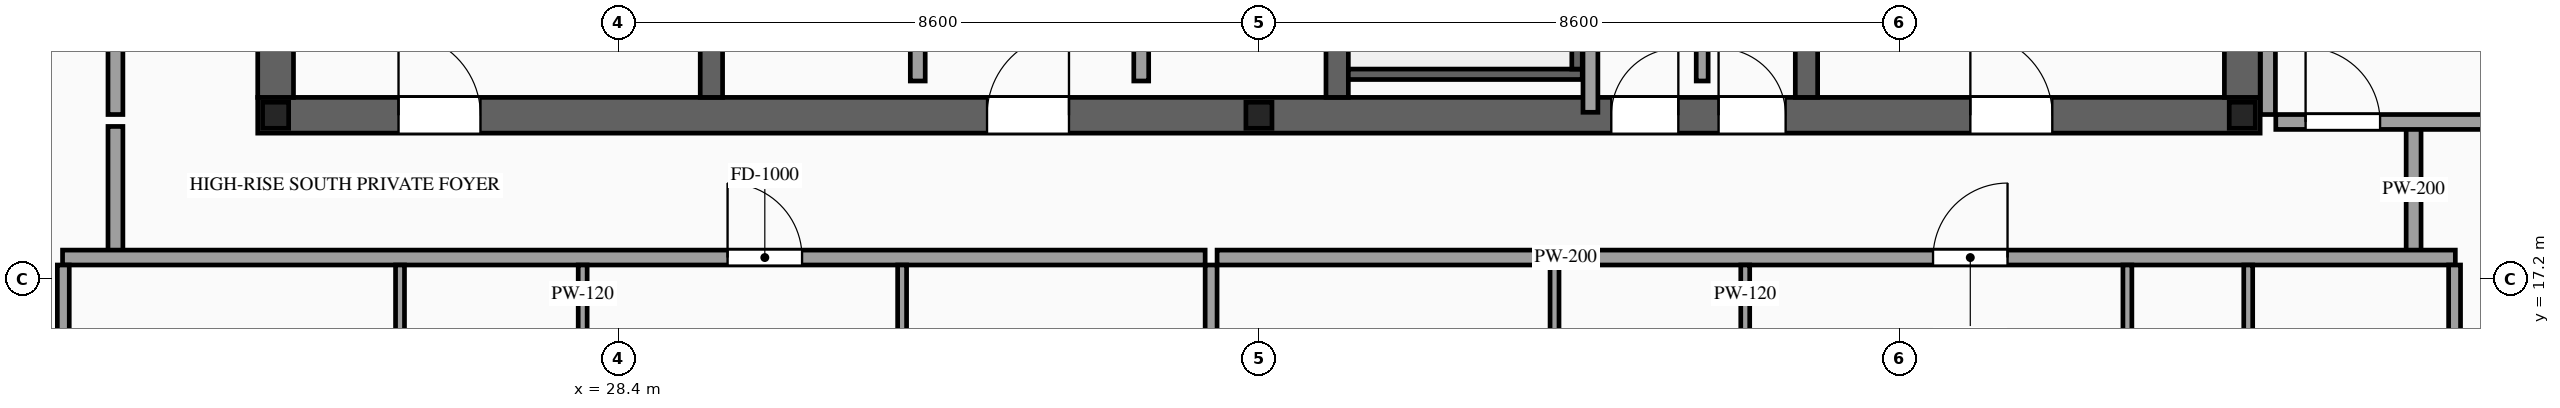
"""IFC4 building model, lengths in metres.
Left out: names, types, materials, properties, quantities, classifications, styles, units other than length and angle.
Written with IfcOpenShell. Run it as: python <this file> out.ifc"""

import sys

from ifc_helpers import new_model, si_unit, direction, frame, frame_2d, origin, origin_2d, place, context, subcontext, project, spatial, rectangle, i_section, extrude, source, transform, mapped, element, fill, save


model = new_model("IFC4")
c1 = context("Model", 3, precision=1e-05, world=origin(), true_north=direction((0.0, 1.0)))
c2 = subcontext(c1, "Body", "Model", "MODEL_VIEW")
j1 = project(units=[si_unit("LENGTHUNIT", "METRE"), si_unit("PLANEANGLEUNIT", "RADIAN")], contexts=[c1])
p1 = place(None, origin())
s1 = spatial("IfcSite", under=j1, at=p1, CompositionType="ELEMENT")
p2 = place(p1, origin())
s2 = spatial("IfcBuilding", under=s1, at=p2, CompositionType="ELEMENT")
p3 = place(p2, frame((0.0, 0.0, 299.6)))
s3 = spatial("IfcBuildingStorey", under=s2, at=p3, CompositionType="ELEMENT", Elevation=299.6)
p4 = place(p3, frame((23.56, 19.4, 0.0), z_axis=(0.0, 0.0, 1.0), x_axis=(1.0, 0.0, 0.0)))
e1 = element("IfcWall", 1, at=p4, inside=s3, PredefinedType="SHEAR", context=c2, shape_type="SweptSolid", body=[
    extrude(rectangle(XDim=26.88, YDim=0.48, at=frame_2d((13.44, 0.0))), origin(), (0.0, 0.0, 1.0), 3.5),
])
p5 = place(p4, frame((1.89, 0.0, 0.0)))
e2 = element("IfcOpeningElement", 2, at=p5, cuts=e1, PredefinedType="OPENING", context=c2, shape_type="SweptSolid", body=[
    extrude(rectangle(XDim=1.1, YDim=2.2, at=frame_2d((0.55, 1.1))), frame((0.0, 0.255, 0.0), z_axis=(0.0, -1.0, 0.0), x_axis=(1.0, 0.0, 0.0)), (0.0, 0.0, 1.0), 0.51),
])
p6 = place(p4, frame((9.79, 0.0, 0.0)))
e3 = element("IfcOpeningElement", 3, at=p6, cuts=e1, PredefinedType="OPENING", context=c2, shape_type="SweptSolid", body=[
    extrude(rectangle(XDim=1.1, YDim=2.2, at=frame_2d((0.55, 1.1))), frame((0.0, 0.255, 0.0), z_axis=(0.0, -1.0, 0.0), x_axis=(1.0, 0.0, 0.0)), (0.0, 0.0, 1.0), 0.51),
])
p7 = place(p4, frame((22.99, 0.0, 0.0)))
e4 = element("IfcOpeningElement", 4, at=p7, cuts=e1, PredefinedType="OPENING", context=c2, shape_type="SweptSolid", body=[
    extrude(rectangle(XDim=1.1, YDim=2.2, at=frame_2d((0.55, 1.1))), frame((0.0, 0.255, 0.0), z_axis=(0.0, -1.0, 0.0), x_axis=(1.0, 0.0, 0.0)), (0.0, 0.0, 1.0), 0.51),
])
p8 = place(p4, frame((19.61, 0.0, 0.0)))
e5 = element("IfcOpeningElement", 5, at=p8, cuts=e1, PredefinedType="OPENING", context=c2, shape_type="SweptSolid", body=[
    extrude(rectangle(XDim=0.9, YDim=2.15, at=frame_2d((0.45, 1.075))), frame((0.0, 0.255, 0.0), z_axis=(0.0, -1.0, 0.0), x_axis=(1.0, 0.0, 0.0)), (0.0, 0.0, 1.0), 0.51),
])
p9 = place(p4, frame((18.17, 0.0, 0.0)))
e6 = element("IfcOpeningElement", 6, at=p9, cuts=e1, PredefinedType="OPENING", context=c2, shape_type="SweptSolid", body=[
    extrude(rectangle(XDim=0.9, YDim=2.15, at=frame_2d((0.45, 1.075))), frame((0.0, 0.255, 0.0), z_axis=(0.0, -1.0, 0.0), x_axis=(1.0, 0.0, 0.0)), (0.0, 0.0, 1.0), 0.51),
])
m1 = source(origin(), c2, "Body", "SweptSolid", [
    extrude(rectangle(XDim=12.32, YDim=0.48, at=frame_2d((6.16, 0.0))), origin(), (0.0, 0.0, 1.0), 3.5),
])
for number, where, z_axis, x_axis in (
    (7, (23.8, 19.64, 0.0), (0.0, 0.0, 1.0), (0.0, 1.0, 0.0)),
    (8, (50.2, 19.64, 0.0), (0.0, 0.0, 1.0), (0.0, 1.0, 0.0)),
):
    element("IfcWall", number, at=place(p3, frame(where, z_axis=z_axis, x_axis=x_axis)), inside=s3, PredefinedType="SHEAR", context=c2, shape_type="MappedRepresentation", body=[
        mapped(m1, transform((0.0, 0.0, 0.0), scale=1.0)),
    ])
m2 = source(origin(), c2, "Body", "SweptSolid", [
    extrude(rectangle(XDim=12.32, YDim=0.3, at=frame_2d((6.16, 0.0))), origin(), (0.0, 0.0, 1.0), 3.5),
])
for number, where, z_axis, x_axis in (
    (9, (29.65, 19.64, 0.0), (0.0, 0.0, 1.0), (0.0, 1.0, 0.0)),
    (10, (38.05, 19.64, 0.0), (0.0, 0.0, 1.0), (0.0, 1.0, 0.0)),
):
    element("IfcWall", number, at=place(p3, frame(where, z_axis=z_axis, x_axis=x_axis)), inside=s3, PredefinedType="SOLIDWALL", context=c2, shape_type="MappedRepresentation", body=[
        mapped(m2, transform((0.0, 0.0, 0.0), scale=1.0)),
    ])
p10 = place(p3, frame((44.35, 19.64, 0.0), z_axis=(0.0, 0.0, 1.0), x_axis=(0.0, 1.0, 0.0)))
e11 = element("IfcWall", 11, at=p10, inside=s3, PredefinedType="SOLIDWALL", context=c2, shape_type="SweptSolid", body=[
    extrude(rectangle(XDim=12.32, YDim=0.3, at=frame_2d((6.16, 0.0))), origin(), (0.0, 0.0, 1.0), 3.5),
])
p11 = place(p10, frame((6.56, 0.0, 0.0)))
e12 = element("IfcOpeningElement", 12, at=p11, cuts=e11, PredefinedType="OPENING", context=c2, shape_type="SweptSolid", body=[
    extrude(rectangle(XDim=1.1, YDim=2.2, at=frame_2d((0.55, 1.1))), frame((0.0, 0.165, 0.0), z_axis=(0.0, -1.0, 0.0), x_axis=(1.0, 0.0, 0.0)), (0.0, 0.0, 1.0), 0.33),
])
p12 = place(p10, frame((8.66, 0.0, 0.0)))
e13 = element("IfcOpeningElement", 13, at=p12, cuts=e11, PredefinedType="OPENING", context=c2, shape_type="SweptSolid", body=[
    extrude(rectangle(XDim=1.1, YDim=2.2, at=frame_2d((0.55, 1.1))), frame((0.0, 0.165, 0.0), z_axis=(0.0, -1.0, 0.0), x_axis=(1.0, 0.0, 0.0)), (0.0, 0.0, 1.0), 0.33),
])
p13 = place(p10, frame((10.76, 0.0, 0.0)))
e14 = element("IfcOpeningElement", 14, at=p13, cuts=e11, PredefinedType="OPENING", context=c2, shape_type="SweptSolid", body=[
    extrude(rectangle(XDim=1.1, YDim=2.2, at=frame_2d((0.55, 1.1))), frame((0.0, 0.165, 0.0), z_axis=(0.0, -1.0, 0.0), x_axis=(1.0, 0.0, 0.0)), (0.0, 0.0, 1.0), 0.33),
])
m3 = source(origin(), c2, "Body", "SweptSolid", [
    extrude(i_section(OverallWidth=0.35, OverallDepth=0.35, WebThickness=0.012, FlangeThickness=0.019, at=origin_2d()), origin(), (0.0, 0.0, 1.0), 3.5),
])
for number, where, z_axis, x_axis in (
    (15, (23.8, 19.4, 0.0), (0.0, 0.0, 1.0), (1.0, 0.0, 0.0)),
    (16, (37.0, 19.4, 0.0), (0.0, 0.0, 1.0), (1.0, 0.0, 0.0)),
    (17, (50.2, 19.4, 0.0), (0.0, 0.0, 1.0), (1.0, 0.0, 0.0)),
):
    element("IfcColumn", number, at=place(p3, frame(where, z_axis=z_axis, x_axis=x_axis)), inside=s3, PredefinedType="COLUMN", context=c2, shape_type="MappedRepresentation", body=[
        mapped(m3, transform((0.0, 0.0, 0.0), scale=1.0)),
    ])
m4 = source(origin(), c2, "Body", "SweptSolid", [
    extrude(rectangle(XDim=3.14, YDim=0.14, at=frame_2d((1.57, 0.0))), origin(), (0.0, 0.0, 1.0), 3.28),
])
p14 = place(p3, frame((38.2, 19.95, 0.0), z_axis=(0.0, 0.0, 1.0), x_axis=(1.0, 0.0, 0.0)))
e18 = element("IfcWall", 18, at=p14, inside=s3, PredefinedType="SOLIDWALL", context=c2, shape_type="MappedRepresentation", body=[
    mapped(m4, transform((0.0, 0.0, 0.0), scale=1.0)),
])
m5 = source(origin(), c2, "Body", "SweptSolid", [
    extrude(rectangle(XDim=8.94, YDim=0.14, at=frame_2d((4.47, 0.0))), origin(), (0.0, 0.0, 1.0), 3.28),
])
p15 = place(p3, frame((41.27, 20.02, 0.0), z_axis=(0.0, 0.0, 1.0), x_axis=(0.0, 1.0, 0.0)))
e19 = element("IfcWall", 19, at=p15, inside=s3, PredefinedType="SOLIDWALL", context=c2, shape_type="MappedRepresentation", body=[
    mapped(m5, transform((0.0, 0.0, 0.0), scale=1.0)),
])
p16 = place(p3, frame((32.42, 19.86, 0.0), z_axis=(0.0, 0.0, 1.0), x_axis=(0.0, 1.0, 0.0)))
e20 = element("IfcWall", 20, at=p16, inside=s3, PredefinedType="PARTITIONING", context=c2, shape_type="SweptSolid", body=[
    extrude(rectangle(XDim=5.84, YDim=0.2, at=frame_2d((2.92, 0.0))), origin(), (0.0, 0.0, 1.0), 3.28),
])
p17 = place(p16, frame((2.47, 0.0, 0.0)))
e21 = element("IfcOpeningElement", 21, at=p17, cuts=e20, PredefinedType="OPENING", context=c2, shape_type="SweptSolid", body=[
    extrude(rectangle(XDim=0.9, YDim=2.15, at=frame_2d((0.45, 1.075))), frame((0.0, 0.115, 0.0), z_axis=(0.0, -1.0, 0.0), x_axis=(1.0, 0.0, 0.0)), (0.0, 0.0, 1.0), 0.23),
])
p18 = place(p3, frame((35.42, 19.86, 0.0), z_axis=(0.0, 0.0, 1.0), x_axis=(0.0, 1.0, 0.0)))
e22 = element("IfcWall", 22, at=p18, inside=s3, PredefinedType="PARTITIONING", context=c2, shape_type="SweptSolid", body=[
    extrude(rectangle(XDim=2.24, YDim=0.2, at=frame_2d((1.12, 0.0))), origin(), (0.0, 0.0, 1.0), 3.28),
])
p19 = place(p18, frame((0.67, 0.0, 0.0)))
e23 = element("IfcOpeningElement", 23, at=p19, cuts=e22, PredefinedType="OPENING", context=c2, shape_type="SweptSolid", body=[
    extrude(rectangle(XDim=0.9, YDim=2.15, at=frame_2d((0.45, 1.075))), frame((0.0, 0.115, 0.0), z_axis=(0.0, -1.0, 0.0), x_axis=(1.0, 0.0, 0.0)), (0.0, 0.0, 1.0), 0.23),
])
m6 = source(origin(), c2, "Body", "SweptSolid", [
    extrude(rectangle(XDim=1.34, YDim=0.16, at=frame_2d((0.67, 0.0))), origin(), (0.0, 0.0, 1.0), 3.28),
])
p20 = place(p3, frame((42.95, 19.86, 0.0), z_axis=(0.0, 0.0, 1.0), x_axis=(0.0, 1.0, 0.0)))
e24 = element("IfcWall", 24, at=p20, inside=s3, PredefinedType="PARTITIONING", context=c2, shape_type="MappedRepresentation", body=[
    mapped(m6, transform((0.0, 0.0, 0.0), scale=1.0)),
])
m7 = source(origin(), c2, "Body", "SweptSolid", [
    extrude(rectangle(XDim=6.06, YDim=0.2, at=frame_2d((3.03, 0.0))), origin(), (0.0, 0.0, 1.0), 3.28),
])
p21 = place(p3, frame((41.45, 19.44, 0.0), z_axis=(0.0, 0.0, 1.0), x_axis=(0.0, 1.0, 0.0)))
e25 = element("IfcWall", 25, at=p21, inside=s3, PredefinedType="PARTITIONING", context=c2, shape_type="MappedRepresentation", body=[
    mapped(m7, transform((0.0, 0.0, 0.0), scale=1.0)),
])
m8 = source(origin(), c2, "Body", "SweptSolid", [
    extrude(rectangle(XDim=1.7, YDim=0.2, at=frame_2d((0.85, 0.0))), origin(), (0.0, 0.0, 1.0), 3.28),
])
for number, where, z_axis, x_axis in (
    (26, (21.65, 17.55, 0.0), (0.0, 0.0, 1.0), (0.0, 1.0, 0.0)),
    (27, (52.5, 17.55, 0.0), (0.0, 0.0, 1.0), (0.0, 1.0, 0.0)),
):
    element("IfcWall", number, at=place(p3, frame(where, z_axis=z_axis, x_axis=x_axis)), inside=s3, PredefinedType="PARTITIONING", context=c2, shape_type="MappedRepresentation", body=[
        mapped(m8, transform((0.0, 0.0, 0.0), scale=1.0)),
    ])
p22 = place(p3, frame((20.94, 17.49, 0.0), z_axis=(0.0, 0.0, 1.0), x_axis=(1.0, 0.0, 0.0)))
e28 = element("IfcWall", 28, at=p22, inside=s3, PredefinedType="PARTITIONING", context=c2, shape_type="SweptSolid", body=[
    extrude(rectangle(XDim=15.338, YDim=0.2, at=frame_2d((7.669, 0.0))), origin(), (0.0, 0.0, 1.0), 3.28),
])
p23 = place(p22, frame((8.927, 0.0, 0.0)))
e29 = element("IfcOpeningElement", 29, at=p23, cuts=e28, PredefinedType="OPENING", context=c2, shape_type="SweptSolid", body=[
    extrude(rectangle(XDim=1.0, YDim=2.2, at=frame_2d((0.5, 1.1))), frame((0.0, 0.115, 0.0), z_axis=(0.0, -1.0, 0.0), x_axis=(1.0, 0.0, 0.0)), (0.0, 0.0, 1.0), 0.23),
])
m9 = source(origin(), c2, "Body", "SweptSolid", [
    extrude(rectangle(XDim=10.54, YDim=0.16, at=frame_2d((5.27, 0.0))), origin(), (0.0, 0.0, 1.0), 3.28),
])
p24 = place(p3, frame((36.358, 6.85, 0.0), z_axis=(0.0, 0.0, 1.0), x_axis=(0.0, 1.0, 0.0)))
e30 = element("IfcWall", 30, at=p24, inside=s3, PredefinedType="PARTITIONING", context=c2, shape_type="MappedRepresentation", body=[
    mapped(m9, transform((0.0, 0.0, 0.0), scale=1.0)),
])
m10 = source(origin(), c2, "Body", "SweptSolid", [
    extrude(rectangle(XDim=2.9, YDim=0.12, at=frame_2d((1.45, 0.0))), origin(), (0.0, 0.0, 1.0), 3.28),
])
p25 = place(p3, frame((25.47, 14.49, 0.0), z_axis=(0.0, 0.0, 1.0), x_axis=(0.0, 1.0, 0.0)))
e31 = element("IfcWall", 31, at=p25, inside=s3, PredefinedType="PARTITIONING", context=c2, shape_type="MappedRepresentation", body=[
    mapped(m10, transform((0.0, 0.0, 0.0), scale=1.0)),
])
p26 = place(p3, frame((27.922, 14.49, 0.0), z_axis=(0.0, 0.0, 1.0), x_axis=(0.0, 1.0, 0.0)))
e32 = element("IfcWall", 32, at=p26, inside=s3, PredefinedType="PARTITIONING", context=c2, shape_type="SweptSolid", body=[
    extrude(rectangle(XDim=2.9, YDim=0.12, at=frame_2d((1.45, 0.0))), origin(), (0.0, 0.0, 1.0), 3.28),
])
p27 = place(p26, frame((1.025, 0.0, 0.0)))
e33 = element("IfcOpeningElement", 33, at=p27, cuts=e32, PredefinedType="OPENING", context=c2, shape_type="SweptSolid", body=[
    extrude(rectangle(XDim=0.85, YDim=2.1, at=frame_2d((0.425, 1.05))), frame((0.0, 0.075, 0.0), z_axis=(0.0, -1.0, 0.0), x_axis=(1.0, 0.0, 0.0)), (0.0, 0.0, 1.0), 0.15),
])
p28 = place(p3, frame((32.21, 14.49, 0.0), z_axis=(0.0, 0.0, 1.0), x_axis=(0.0, 1.0, 0.0)))
e34 = element("IfcWall", 34, at=p28, inside=s3, PredefinedType="PARTITIONING", context=c2, shape_type="MappedRepresentation", body=[
    mapped(m10, transform((0.0, 0.0, 0.0), scale=1.0)),
])
p29 = place(p3, frame((36.438, 17.49, 0.0), z_axis=(0.0, 0.0, 1.0), x_axis=(1.0, 0.0, 0.0)))
e35 = element("IfcWall", 35, at=p29, inside=s3, PredefinedType="PARTITIONING", context=c2, shape_type="SweptSolid", body=[
    extrude(rectangle(XDim=16.622, YDim=0.2, at=frame_2d((8.311, 0.0))), origin(), (0.0, 0.0, 1.0), 3.28),
])
p30 = place(p29, frame((9.611, 0.0, 0.0)))
e36 = element("IfcOpeningElement", 36, at=p30, cuts=e35, PredefinedType="OPENING", context=c2, shape_type="SweptSolid", body=[
    extrude(rectangle(XDim=1.0, YDim=2.2, at=frame_2d((0.5, 1.1))), frame((0.0, 0.115, 0.0), z_axis=(0.0, -1.0, 0.0), x_axis=(1.0, 0.0, 0.0)), (0.0, 0.0, 1.0), 0.23),
])
m11 = source(origin(), c2, "Body", "SweptSolid", [
    extrude(rectangle(XDim=10.39, YDim=0.16, at=frame_2d((5.195, 0.0))), origin(), (0.0, 0.0, 1.0), 3.28),
])
for number, where, z_axis, x_axis in (
    (37, (20.95, 7.0, 0.0), (0.0, 0.0, 1.0), (0.0, 1.0, 0.0)),
    (38, (53.05, 7.0, 0.0), (0.0, 0.0, 1.0), (0.0, 1.0, 0.0)),
):
    element("IfcWall", number, at=place(p3, frame(where, z_axis=z_axis, x_axis=x_axis)), inside=s3, PredefinedType="PARTITIONING", context=c2, shape_type="MappedRepresentation", body=[
        mapped(m11, transform((0.0, 0.0, 0.0), scale=1.0)),
    ])
p31 = place(p3, frame((40.968, 14.49, 0.0), z_axis=(0.0, 0.0, 1.0), x_axis=(0.0, 1.0, 0.0)))
e39 = element("IfcWall", 39, at=p31, inside=s3, PredefinedType="PARTITIONING", context=c2, shape_type="MappedRepresentation", body=[
    mapped(m10, transform((0.0, 0.0, 0.0), scale=1.0)),
])
p32 = place(p3, frame((43.528, 14.49, 0.0), z_axis=(0.0, 0.0, 1.0), x_axis=(0.0, 1.0, 0.0)))
e40 = element("IfcWall", 40, at=p32, inside=s3, PredefinedType="PARTITIONING", context=c2, shape_type="SweptSolid", body=[
    extrude(rectangle(XDim=2.9, YDim=0.12, at=frame_2d((1.45, 0.0))), origin(), (0.0, 0.0, 1.0), 3.28),
])
p33 = place(p32, frame((1.025, 0.0, 0.0)))
e41 = element("IfcOpeningElement", 41, at=p33, cuts=e40, PredefinedType="OPENING", context=c2, shape_type="SweptSolid", body=[
    extrude(rectangle(XDim=0.85, YDim=2.1, at=frame_2d((0.425, 1.05))), frame((0.0, 0.075, 0.0), z_axis=(0.0, -1.0, 0.0), x_axis=(1.0, 0.0, 0.0)), (0.0, 0.0, 1.0), 0.15),
])
m12 = source(origin(), c2, "Body", "SweptSolid", [
    extrude(rectangle(XDim=2.9, YDim=0.12, at=frame_2d((1.45, 0.0))), origin(), (0.0, 0.0, 1.0), 2.825),
])
p34 = place(p3, frame((50.28, 14.49, 0.0), z_axis=(0.0, 0.0, 1.0), x_axis=(0.0, 1.0, 0.0)))
e42 = element("IfcWall", 42, at=p34, inside=s3, PredefinedType="PARTITIONING", context=c2, shape_type="MappedRepresentation", body=[
    mapped(m12, transform((0.0, 0.0, 0.0), scale=1.0)),
])
p35 = place(p3, frame((48.658, 14.49, 0.0), z_axis=(0.0, 0.0, 1.0), x_axis=(0.0, 1.0, 0.0)))
e43 = element("IfcWall", 43, at=p35, inside=s3, PredefinedType="PARTITIONING", context=c2, shape_type="MappedRepresentation", body=[
    mapped(m10, transform((0.0, 0.0, 0.0), scale=1.0)),
])
p36 = place(p3, frame((21.65, 19.41, 0.0), z_axis=(0.0, 0.0, 1.0), x_axis=(0.0, 1.0, 0.0)))
e44 = element("IfcWall", 44, at=p36, inside=s3, PredefinedType="PARTITIONING", context=c2, shape_type="SweptSolid", body=[
    extrude(rectangle(XDim=12.78, YDim=0.2, at=frame_2d((6.39, 0.0))), origin(), (0.0, 0.0, 1.0), 3.28),
])
p37 = place(p36, frame((5.89, 0.0, 0.0)))
e45 = element("IfcOpeningElement", 45, at=p37, cuts=e44, PredefinedType="OPENING", context=c2, shape_type="SweptSolid", body=[
    extrude(rectangle(XDim=1.0, YDim=2.2, at=frame_2d((0.5, 1.1))), frame((0.0, 0.115, 0.0), z_axis=(0.0, -1.0, 0.0), x_axis=(1.0, 0.0, 0.0)), (0.0, 0.0, 1.0), 0.23),
])
p38 = place(p3, frame((50.65, 19.31, 0.0), z_axis=(0.0, 0.0, 1.0), x_axis=(1.0, 0.0, 0.0)))
e46 = element("IfcWall", 46, at=p38, inside=s3, PredefinedType="PARTITIONING", context=c2, shape_type="SweptSolid", body=[
    extrude(rectangle(XDim=5.3, YDim=0.2, at=frame_2d((2.65, 0.0))), origin(), (0.0, 0.0, 1.0), 2.825),
])
p39 = place(p38, frame((0.4, 0.0, 0.0)))
e47 = element("IfcOpeningElement", 47, at=p39, cuts=e46, PredefinedType="OPENING", context=c2, shape_type="SweptSolid", body=[
    extrude(rectangle(XDim=1.0, YDim=2.2, at=frame_2d((0.5, 1.1))), frame((0.0, 0.115, 0.0), z_axis=(0.0, -1.0, 0.0), x_axis=(1.0, 0.0, 0.0)), (0.0, 0.0, 1.0), 0.23),
])
m13 = source(origin(), c2, "Body", "SweptSolid", [
    extrude(rectangle(XDim=12.78, YDim=0.2, at=frame_2d((6.39, 0.0))), origin(), (0.0, 0.0, 1.0), 3.28),
])
p40 = place(p3, frame((50.545, 19.41, 0.0), z_axis=(0.0, 0.0, 1.0), x_axis=(0.0, 1.0, 0.0)))
e48 = element("IfcWall", 48, at=p40, inside=s3, PredefinedType="PARTITIONING", context=c2, shape_type="MappedRepresentation", body=[
    mapped(m13, transform((0.0, 0.0, 0.0), scale=1.0)),
])
m14 = source(origin(), c2, "Body", "SweptSolid", [
    extrude(rectangle(XDim=1.1, YDim=2.2, at=frame_2d((0.55, 1.1))), frame((0.0, 0.025, 0.0), z_axis=(0.0, -1.0, 0.0), x_axis=(1.0, 0.0, 0.0)), (0.0, 0.0, 1.0), 0.05),
])
p41 = place(p5, origin())
e49 = element("IfcDoor", 49, at=p41, inside=s3, OperationType="SINGLE_SWING_LEFT", PredefinedType="DOOR", context=c2, shape_type="MappedRepresentation", body=[
    mapped(m14, transform((0.0, 0.0, 0.0), scale=1.0)),
])
fill(e2, e49)
p42 = place(p6, origin())
e50 = element("IfcDoor", 50, at=p42, inside=s3, OperationType="SINGLE_SWING_RIGHT", PredefinedType="DOOR", context=c2, shape_type="MappedRepresentation", body=[
    mapped(m14, transform((0.0, 0.0, 0.0), scale=1.0)),
])
fill(e3, e50)
p43 = place(p7, origin())
e51 = element("IfcDoor", 51, at=p43, inside=s3, OperationType="SINGLE_SWING_LEFT", PredefinedType="DOOR", context=c2, shape_type="MappedRepresentation", body=[
    mapped(m14, transform((0.0, 0.0, 0.0), scale=1.0)),
])
fill(e4, e51)
m15 = source(origin(), c2, "Body", "SweptSolid", [
    extrude(rectangle(XDim=0.9, YDim=2.15, at=frame_2d((0.45, 1.075))), frame((0.0, 0.025, 0.0), z_axis=(0.0, -1.0, 0.0), x_axis=(1.0, 0.0, 0.0)), (0.0, 0.0, 1.0), 0.05),
])
p44 = place(p8, origin())
e52 = element("IfcDoor", 52, at=p44, inside=s3, OperationType="SINGLE_SWING_LEFT", PredefinedType="DOOR", context=c2, shape_type="MappedRepresentation", body=[
    mapped(m15, transform((0.0, 0.0, 0.0), scale=1.0)),
])
fill(e5, e52)
p45 = place(p9, origin())
e53 = element("IfcDoor", 53, at=p45, inside=s3, OperationType="SINGLE_SWING_RIGHT", PredefinedType="DOOR", context=c2, shape_type="MappedRepresentation", body=[
    mapped(m15, transform((0.0, 0.0, 0.0), scale=1.0)),
])
fill(e6, e53)
m16 = source(origin(), c2, "Body", "SweptSolid", [
    extrude(rectangle(XDim=1.0, YDim=2.2, at=frame_2d((0.5, 1.1))), frame((0.0, 0.025, 0.0), z_axis=(0.0, -1.0, 0.0), x_axis=(1.0, 0.0, 0.0)), (0.0, 0.0, 1.0), 0.05),
])
p46 = place(p23, origin())
e54 = element("IfcDoor", 54, at=p46, inside=s3, OperationType="SINGLE_SWING_LEFT", PredefinedType="DOOR", context=c2, shape_type="MappedRepresentation", body=[
    mapped(m16, transform((0.0, 0.0, 0.0), scale=1.0)),
])
fill(e29, e54)
p47 = place(p30, origin())
e55 = element("IfcDoor", 55, at=p47, inside=s3, OperationType="SINGLE_SWING_RIGHT", PredefinedType="DOOR", context=c2, shape_type="MappedRepresentation", body=[
    mapped(m16, transform((0.0, 0.0, 0.0), scale=1.0)),
])
fill(e36, e55)
p48 = place(p39, origin())
e56 = element("IfcDoor", 56, at=p48, inside=s3, OperationType="SINGLE_SWING_LEFT", PredefinedType="DOOR", context=c2, shape_type="MappedRepresentation", body=[
    mapped(m16, transform((0.0, 0.0, 0.0), scale=1.0)),
])
fill(e47, e56)
save(model, sys.argv[1])
